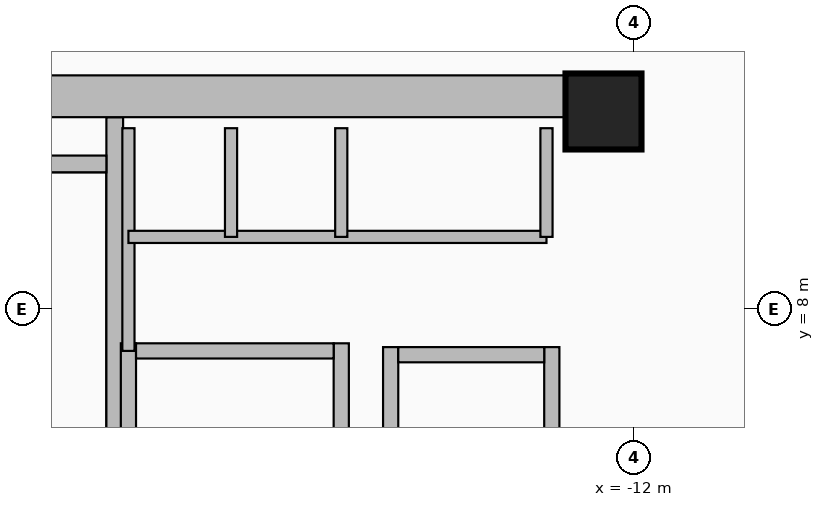
"""IFC4 building model, lengths in metres.
Left out: names, types, materials, properties, quantities, classifications, styles, units other than length and angle.
Written with IfcOpenShell. Run it as: python <this file> out.ifc"""

import sys

from ifc_helpers import new_model, si_unit, direction, frame, frame_2d, origin, origin_2d, place, context, subcontext, project, spatial, rectangle, extrude, source, transform, mapped, element, fill, save


model = new_model("IFC4")
c1 = context("Model", 3, precision=1e-05, world=origin(), true_north=direction((0.0, 1.0)))
c2 = subcontext(c1, "Body", "Model", "MODEL_VIEW")
j1 = project(units=[si_unit("LENGTHUNIT", "METRE"), si_unit("PLANEANGLEUNIT", "RADIAN")], contexts=[c1])
p1 = place(None, origin())
s1 = spatial("IfcSite", under=j1, at=p1, CompositionType="ELEMENT")
p2 = place(p1, origin())
s2 = spatial("IfcBuilding", under=s1, at=p2, CompositionType="ELEMENT")
p3 = place(p2, frame((0.0, 0.0, 180.5)))
s3 = spatial("IfcBuildingStorey", under=s2, at=p3, CompositionType="ELEMENT", Elevation=180.5)
p4 = place(p3, frame((-18.83, 1.78, 0.0), z_axis=(0.0, 0.0, 1.0), x_axis=(0.0, 1.0, 0.0)))
e1 = element("IfcWall", 1, at=p4, inside=s3, PredefinedType="SHEAR", context=c2, shape_type="SweptSolid", body=[
    extrude(rectangle(XDim=8.745, YDim=0.22, at=frame_2d((4.373, 0.0))), origin(), (0.0, 0.0, 1.0), 3.63),
])
p5 = place(p3, frame((-22.05, 9.91, 0.0), z_axis=(0.0, 0.0, 1.0), x_axis=(1.0, 0.0, 0.0)))
e2 = element("IfcWall", 2, at=p5, inside=s3, PredefinedType="SHEAR", context=c2, shape_type="SweptSolid", body=[
    extrude(rectangle(XDim=3.11, YDim=0.22, at=frame_2d((1.555, 0.0))), origin(), (0.0, 0.0, 1.0), 3.63),
])
p6 = place(p3, frame((-22.65, 10.8, 0.0), z_axis=(0.0, 0.0, 1.0), x_axis=(1.0, 0.0, 0.0)))
e3 = element("IfcWall", 3, at=p6, inside=s3, PredefinedType="SHEAR", context=c2, shape_type="SweptSolid", body=[
    extrude(rectangle(XDim=10.25, YDim=0.55, at=frame_2d((5.125, 0.0))), origin(), (0.0, 0.0, 1.0), 3.63),
])
m1 = source(origin(), c2, "Body", "SweptSolid", [
    extrude(rectangle(XDim=1.0, YDim=1.0, at=origin_2d()), origin(), (0.0, 0.0, 1.0), 3.95),
])
p7 = place(p3, frame((-12.4, 10.6, 0.0), z_axis=(0.0, 0.0, 1.0), x_axis=(1.0, 0.0, 0.0)))
e4 = element("IfcColumn", 4, at=p7, inside=s3, PredefinedType="COLUMN", context=c2, shape_type="MappedRepresentation", body=[
    mapped(m1, transform((0.0, 0.0, 0.0), x_axis=(1.0, 0.0, 0.0), y_axis=(0.0, 1.0, 0.0), z_axis=(0.0, 0.0, 1.0), scale=1.0)),
])
for number, where, z_axis, x_axis in (
    (5, (-18.65, 4.225, 0.0), (0.0, 0.0, 1.0), (0.0, 1.0, 0.0)),
    (6, (-15.85, 4.225, 0.0), (0.0, 0.0, 1.0), (0.0, 1.0, 0.0)),
):
    element("IfcWall", number, at=place(p3, frame(where, z_axis=z_axis, x_axis=x_axis)), inside=s3, PredefinedType="MOVABLE", context=c2, shape_type="SweptSolid", body=[
        extrude(rectangle(XDim=3.325, YDim=0.2, at=frame_2d((1.663, 0.0))), origin(), (0.0, 0.0, 1.0), 3.63),
    ])
p8 = place(p3, frame((-18.55, 7.45, 0.0), z_axis=(0.0, 0.0, 1.0), x_axis=(1.0, 0.0, 0.0)))
e7 = element("IfcWall", 7, at=p8, inside=s3, PredefinedType="MOVABLE", context=c2, shape_type="SweptSolid", body=[
    extrude(rectangle(XDim=2.6, YDim=0.2, at=frame_2d((1.3, 0.0))), origin(), (0.0, 0.0, 1.0), 3.63),
])
p9 = place(p8, frame((0.7, 0.0, 0.0)))
e8 = element("IfcOpeningElement", 8, at=p9, cuts=e7, PredefinedType="OPENING", context=c2, shape_type="SweptSolid", body=[
    extrude(rectangle(XDim=1.2, YDim=2.1, at=frame_2d((0.6, 1.05))), frame((0.0, 0.115, 0.0), z_axis=(0.0, -1.0, 0.0), x_axis=(1.0, 0.0, 0.0)), (0.0, 0.0, 1.0), 0.23),
])
for number, where, z_axis, x_axis in (
    (9, (-15.2, 5.25, 0.0), (0.0, 0.0, 1.0), (0.0, 1.0, 0.0)),
    (10, (-13.08, 5.25, 0.0), (0.0, 0.0, 1.0), (0.0, 1.0, 0.0)),
):
    element("IfcWall", number, at=place(p3, frame(where, z_axis=z_axis, x_axis=x_axis)), inside=s3, PredefinedType="MOVABLE", context=c2, shape_type="SweptSolid", body=[
        extrude(rectangle(XDim=2.25, YDim=0.2, at=frame_2d((1.125, 0.0))), origin(), (0.0, 0.0, 1.0), 3.63),
    ])
p10 = place(p3, frame((-15.1, 7.4, 0.0), z_axis=(0.0, 0.0, 1.0), x_axis=(1.0, 0.0, 0.0)))
e11 = element("IfcWall", 11, at=p10, inside=s3, PredefinedType="MOVABLE", context=c2, shape_type="SweptSolid", body=[
    extrude(rectangle(XDim=1.92, YDim=0.2, at=frame_2d((0.96, 0.0))), origin(), (0.0, 0.0, 1.0), 3.63),
])
p11 = place(p3, frame((-18.65, 7.45, 0.0), z_axis=(0.0, 0.0, 1.0), x_axis=(0.0, 1.0, 0.0)))
e12 = element("IfcWall", 12, at=p11, inside=s3, PredefinedType="PARTITIONING", context=c2, shape_type="SweptSolid", body=[
    extrude(rectangle(XDim=2.93, YDim=0.16, at=frame_2d((1.465, 0.0))), origin(), (0.0, 0.0, 1.0), 3.63),
])
p12 = place(p3, frame((-18.65, 8.95, 0.0), z_axis=(0.0, 0.0, 1.0), x_axis=(1.0, 0.0, 0.0)))
e13 = element("IfcWall", 13, at=p12, inside=s3, PredefinedType="PARTITIONING", context=c2, shape_type="SweptSolid", body=[
    extrude(rectangle(XDim=5.5, YDim=0.16, at=frame_2d((2.75, 0.0))), origin(), (0.0, 0.0, 1.0), 3.63),
])
p13 = place(p12, frame((0.3, 0.0, 0.0)))
e14 = element("IfcOpeningElement", 14, at=p13, cuts=e13, PredefinedType="OPENING", context=c2, shape_type="SweptSolid", body=[
    extrude(rectangle(XDim=0.85, YDim=2.05, at=frame_2d((0.425, 1.025))), frame((0.0, 0.095, 0.0), z_axis=(0.0, -1.0, 0.0), x_axis=(1.0, 0.0, 0.0)), (0.0, 0.0, 1.0), 0.19),
])
p14 = place(p12, frame((3.2, 0.0, 0.0)))
e15 = element("IfcOpeningElement", 15, at=p14, cuts=e13, PredefinedType="OPENING", context=c2, shape_type="SweptSolid", body=[
    extrude(rectangle(XDim=0.85, YDim=2.05, at=frame_2d((0.425, 1.025))), frame((0.0, 0.095, 0.0), z_axis=(0.0, -1.0, 0.0), x_axis=(1.0, 0.0, 0.0)), (0.0, 0.0, 1.0), 0.19),
])
for number, where, z_axis, x_axis in (
    (16, (-13.15, 8.95, 0.0), (0.0, 0.0, 1.0), (0.0, 1.0, 0.0)),
    (17, (-17.3, 8.95, 0.0), (0.0, 0.0, 1.0), (0.0, 1.0, 0.0)),
):
    element("IfcWall", number, at=place(p3, frame(where, z_axis=z_axis, x_axis=x_axis)), inside=s3, PredefinedType="PARTITIONING", context=c2, shape_type="SweptSolid", body=[
        extrude(rectangle(XDim=1.43, YDim=0.16, at=frame_2d((0.715, 0.0))), origin(), (0.0, 0.0, 1.0), 3.63),
    ])
p15 = place(p3, frame((-15.85, 8.95, 0.0), z_axis=(0.0, 0.0, 1.0), x_axis=(0.0, 1.0, 0.0)))
e18 = element("IfcWall", 18, at=p15, inside=s3, PredefinedType="PARTITIONING", context=c2, shape_type="SweptSolid", body=[
    extrude(rectangle(XDim=1.43, YDim=0.16, at=frame_2d((0.715, 0.0))), origin(), (0.0, 0.0, 1.0), 3.63),
])
p16 = place(p15, frame((0.29, 0.0, 0.0)))
e19 = element("IfcOpeningElement", 19, at=p16, cuts=e18, PredefinedType="OPENING", context=c2, shape_type="SweptSolid", body=[
    extrude(rectangle(XDim=0.85, YDim=2.05, at=frame_2d((0.425, 1.025))), frame((0.0, 0.095, 0.0), z_axis=(0.0, -1.0, 0.0), x_axis=(1.0, 0.0, 0.0)), (0.0, 0.0, 1.0), 0.19),
])
p17 = place(p9, origin())
e20 = element("IfcDoor", 20, at=p17, inside=s3, OperationType="DOUBLE_DOOR_SLIDING", PredefinedType="DOOR", context=c2, shape_type="SweptSolid", body=[
    extrude(rectangle(XDim=1.2, YDim=2.1, at=frame_2d((0.6, 1.05))), frame((0.0, 0.025, 0.0), z_axis=(0.0, -1.0, 0.0), x_axis=(1.0, 0.0, 0.0)), (0.0, 0.0, 1.0), 0.05),
])
fill(e8, e20)
p18 = place(p13, origin())
e21 = element("IfcDoor", 21, at=p18, inside=s3, OperationType="SINGLE_SWING_LEFT", PredefinedType="DOOR", context=c2, shape_type="SweptSolid", body=[
    extrude(rectangle(XDim=0.85, YDim=2.05, at=frame_2d((0.425, 1.025))), frame((0.0, 0.025, 0.0), z_axis=(0.0, -1.0, 0.0), x_axis=(1.0, 0.0, 0.0)), (0.0, 0.0, 1.0), 0.05),
])
fill(e14, e21)
p19 = place(p14, origin())
e22 = element("IfcDoor", 22, at=p19, inside=s3, OperationType="SINGLE_SWING_RIGHT", PredefinedType="DOOR", context=c2, shape_type="SweptSolid", body=[
    extrude(rectangle(XDim=0.85, YDim=2.05, at=frame_2d((0.425, 1.025))), frame((0.0, 0.025, 0.0), z_axis=(0.0, -1.0, 0.0), x_axis=(1.0, 0.0, 0.0)), (0.0, 0.0, 1.0), 0.05),
])
fill(e15, e22)
p20 = place(p16, origin())
e23 = element("IfcDoor", 23, at=p20, inside=s3, OperationType="SINGLE_SWING_LEFT", PredefinedType="DOOR", context=c2, shape_type="SweptSolid", body=[
    extrude(rectangle(XDim=0.85, YDim=2.05, at=frame_2d((0.425, 1.025))), frame((0.0, 0.025, 0.0), z_axis=(0.0, -1.0, 0.0), x_axis=(1.0, 0.0, 0.0)), (0.0, 0.0, 1.0), 0.05),
])
fill(e19, e23)
save(model, sys.argv[1])
